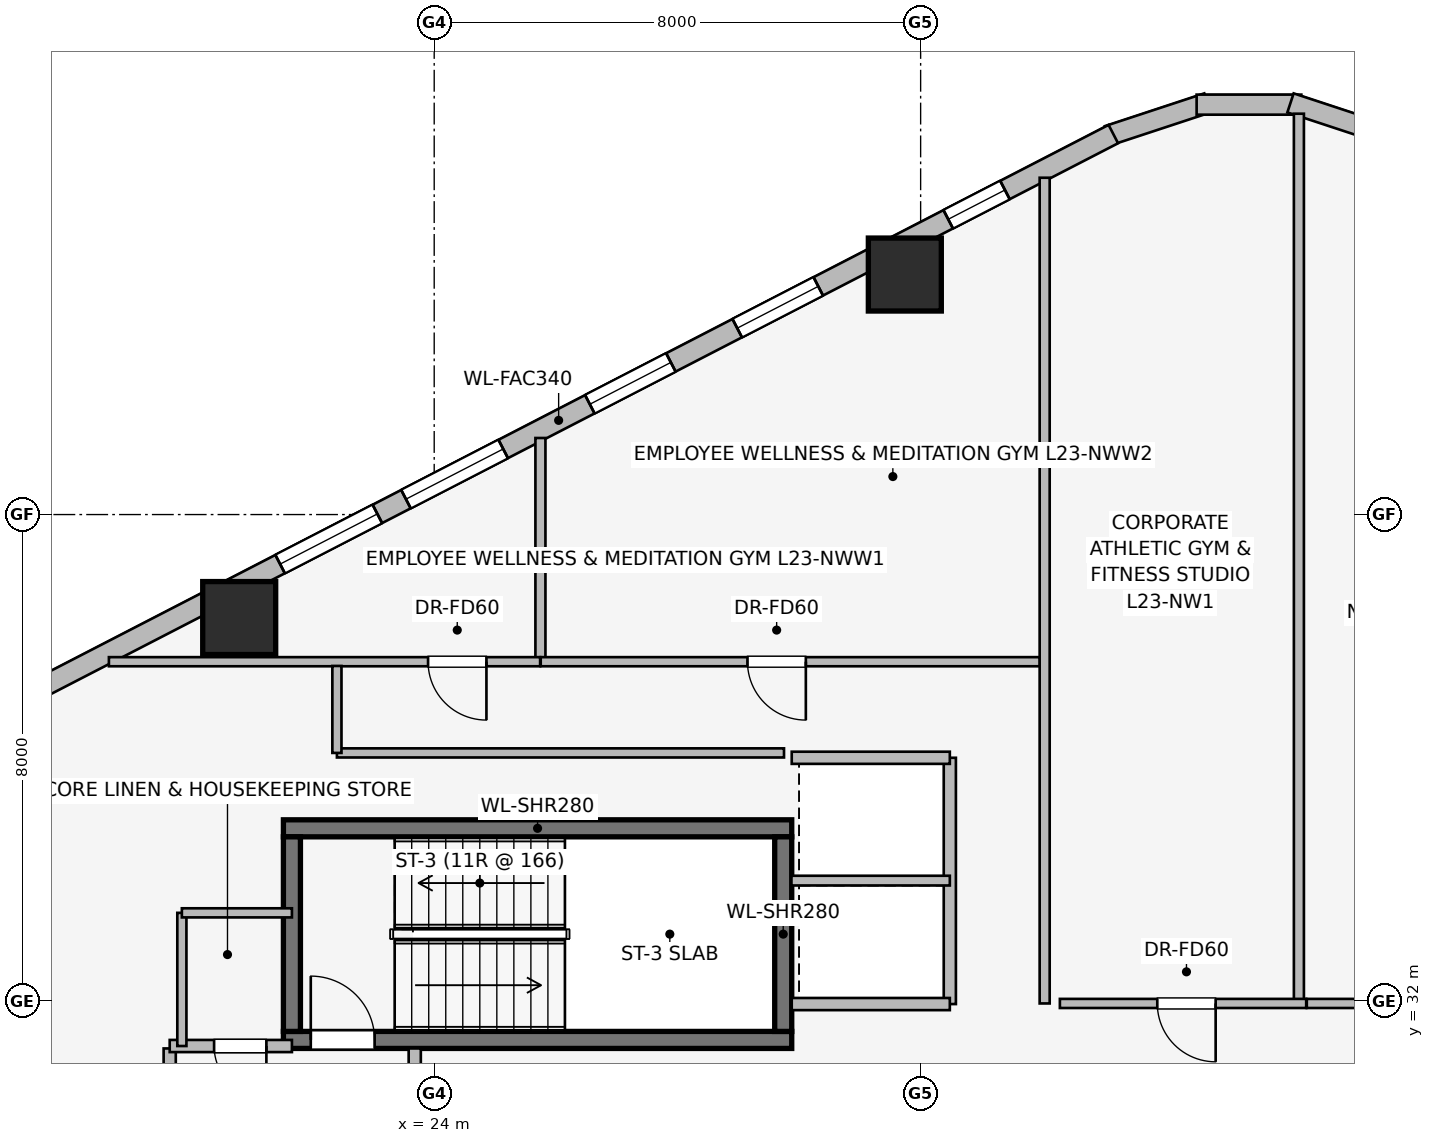
"""IFC4 building model, lengths in metres.
Left out: names, types, materials, properties, quantities, classifications, styles, units other than length and angle.
Written with IfcOpenShell. Run it as: python <this file> out.ifc"""

import sys

from ifc_helpers import new_model, si_unit, direction, frame, frame_2d, origin, origin_2d, place, context, subcontext, project, spatial, rectangle, extrude, element, fill, save


model = new_model("IFC4")
c1 = context("Model", 3, precision=1e-05, world=origin(), true_north=direction((0.0, 1.0)))
c2 = subcontext(c1, "Body", "Model", "MODEL_VIEW")
j1 = project(units=[si_unit("LENGTHUNIT", "METRE"), si_unit("PLANEANGLEUNIT", "RADIAN")], contexts=[c1])
p1 = place(None, origin())
s1 = spatial("IfcSite", under=j1, at=p1, CompositionType="ELEMENT")
p2 = place(p1, origin())
s2 = spatial("IfcBuilding", under=s1, at=p2, CompositionType="ELEMENT")
p3 = place(p2, frame((0.0, 0.0, 89.05)))
s3 = spatial("IfcBuildingStorey", under=s2, at=p3, CompositionType="ELEMENT", Elevation=89.05)
p4 = place(p3, frame((21.52, 31.36, 0.0), z_axis=(0.0, 0.0, 1.0), x_axis=(1.0, 0.0, 0.0)))
e1 = element("IfcWall", 1, at=p4, inside=s3, PredefinedType="SHEAR", context=c2, shape_type="SweptSolid", body=[
    extrude(rectangle(XDim=8.36, YDim=0.28, at=frame_2d((4.18, 0.0))), origin(), (0.0, 0.0, 1.0), 3.65),
])
p5 = place(p4, frame((0.45, 0.0, 0.0)))
e2 = element("IfcOpeningElement", 2, at=p5, cuts=e1, PredefinedType="OPENING", context=c2, shape_type="SweptSolid", body=[
    extrude(rectangle(XDim=1.05, YDim=2.0, at=frame_2d((0.525, 1.0))), frame((0.0, 0.15, 0.0), z_axis=(0.0, -1.0, 0.0), x_axis=(1.0, 0.0, 0.0)), (0.0, 0.0, 1.0), 0.3),
])
p6 = place(p3, frame((29.88, 34.84, 0.0), z_axis=(0.0, 0.0, 1.0), x_axis=(-1.0, 0.0, 0.0)))
e3 = element("IfcWall", 3, at=p6, inside=s3, PredefinedType="SHEAR", context=c2, shape_type="SweptSolid", body=[
    extrude(rectangle(XDim=8.36, YDim=0.28, at=frame_2d((4.18, 0.0))), origin(), (0.0, 0.0, 1.0), 3.65),
])
for number, where, z_axis, x_axis in (
    (4, (21.66, 34.7, 0.0), (0.0, 0.0, 1.0), (0.0, -1.0, 0.0)),
    (5, (29.74, 31.5, 0.0), (0.0, 0.0, 1.0), (0.0, 1.0, 0.0)),
):
    element("IfcWall", number, at=place(p3, frame(where, z_axis=z_axis, x_axis=x_axis)), inside=s3, PredefinedType="SHEAR", context=c2, shape_type="SweptSolid", body=[
        extrude(rectangle(XDim=3.2, YDim=0.28, at=frame_2d((1.6, 0.0))), origin(), (0.0, 0.0, 1.0), 3.65),
    ])
for number, where, z_axis, x_axis in (
    (6, (31.74, 43.947, 0.0), (0.0, 0.0, 1.0), (1.0, 0.0, 0.0)),
    (7, (20.793, 38.298, 0.0), (0.0, 0.0, 1.0), (1.0, 0.0, 0.0)),
):
    element("IfcColumn", number, at=place(p3, frame(where, z_axis=z_axis, x_axis=x_axis)), inside=s3, PredefinedType="COLUMN", context=c2, shape_type="SweptSolid", body=[
        extrude(rectangle(XDim=1.2, YDim=1.2, at=origin_2d()), origin(), (0.0, 0.0, 1.0), 3.65),
    ])
p7 = place(p3, frame((35.081, 46.231, 0.0), z_axis=(0.0, 0.0, 1.0), x_axis=(0.94976901097, 0.312951794691, 0.0)))
e8 = element("IfcWall", 8, at=p7, inside=s3, PredefinedType="STANDARD", context=c2, shape_type="SweptSolid", body=[
    extrude(rectangle(XDim=1.722, YDim=0.33, at=frame_2d((0.861, 0.0))), origin(), (0.0, 0.0, 1.0), 3.39),
])
p8 = place(p3, frame((36.539, 46.741, 0.0), z_axis=(0.0, 0.0, 1.0), x_axis=(1.0, 0.0, 0.0)))
e9 = element("IfcWall", 9, at=p8, inside=s3, PredefinedType="STANDARD", context=c2, shape_type="SweptSolid", body=[
    extrude(rectangle(XDim=1.722, YDim=0.33, at=frame_2d((0.861, 0.0))), origin(), (0.0, 0.0, 1.0), 3.39),
])
p9 = place(p3, frame((38.083, 46.77, 0.0), z_axis=(0.0, 0.0, 1.0), x_axis=(0.94976901097, -0.312951794691, 0.0)))
e10 = element("IfcWall", 10, at=p9, inside=s3, PredefinedType="STANDARD", context=c2, shape_type="SweptSolid", body=[
    extrude(rectangle(XDim=1.722, YDim=0.33, at=frame_2d((0.861, 0.0))), origin(), (0.0, 0.0, 1.0), 3.39),
])
p10 = place(p3, frame((16.924, 36.841, 0.0), z_axis=(0.0, 0.0, 1.0), x_axis=(0.888634413993, 0.458616264721, 0.0)))
e11 = element("IfcWall", 11, at=p10, inside=s3, PredefinedType="STANDARD", context=c2, shape_type="SweptSolid", body=[
    extrude(rectangle(XDim=20.531, YDim=0.34, at=frame_2d((10.266, 0.0))), origin(), (0.0, 0.0, 1.0), 2.684),
])
p11 = place(p10, frame((5.111, 0.0, 0.75)))
e12 = element("IfcOpeningElement", 12, at=p11, cuts=e11, PredefinedType="OPENING", context=c2, shape_type="SweptSolid", body=[
    extrude(rectangle(XDim=1.8, YDim=1.5, at=frame_2d((0.9, 0.75))), frame((0.0, 0.18, 0.0), z_axis=(0.0, -1.0, 0.0), x_axis=(1.0, 0.0, 0.0)), (0.0, 0.0, 1.0), 0.36),
])
p12 = place(p10, frame((7.44, 0.0, 0.75)))
e13 = element("IfcOpeningElement", 13, at=p12, cuts=e11, PredefinedType="OPENING", context=c2, shape_type="SweptSolid", body=[
    extrude(rectangle(XDim=1.8, YDim=1.5, at=frame_2d((0.9, 0.75))), frame((0.0, 0.18, 0.0), z_axis=(0.0, -1.0, 0.0), x_axis=(1.0, 0.0, 0.0)), (0.0, 0.0, 1.0), 0.36),
])
p13 = place(p10, frame((10.843, 0.0, 0.75)))
e14 = element("IfcOpeningElement", 14, at=p13, cuts=e11, PredefinedType="OPENING", context=c2, shape_type="SweptSolid", body=[
    extrude(rectangle(XDim=1.5, YDim=1.5, at=frame_2d((0.75, 0.75))), frame((0.0, 0.18, 0.0), z_axis=(0.0, -1.0, 0.0), x_axis=(1.0, 0.0, 0.0)), (0.0, 0.0, 1.0), 0.36),
])
p14 = place(p10, frame((13.571, 0.0, 0.75)))
e15 = element("IfcOpeningElement", 15, at=p14, cuts=e11, PredefinedType="OPENING", context=c2, shape_type="SweptSolid", body=[
    extrude(rectangle(XDim=1.5, YDim=1.5, at=frame_2d((0.75, 0.75))), frame((0.0, 0.18, 0.0), z_axis=(0.0, -1.0, 0.0), x_axis=(1.0, 0.0, 0.0)), (0.0, 0.0, 1.0), 0.36),
])
p15 = place(p10, frame((17.476, 0.0, 0.75)))
e16 = element("IfcOpeningElement", 16, at=p15, cuts=e11, PredefinedType="OPENING", context=c2, shape_type="SweptSolid", body=[
    extrude(rectangle(XDim=1.05, YDim=1.4, at=frame_2d((0.525, 0.7))), frame((0.0, 0.18, 0.0), z_axis=(0.0, -1.0, 0.0), x_axis=(1.0, 0.0, 0.0)), (0.0, 0.0, 1.0), 0.36),
])
p16 = place(p3, frame((19.65, 25.68, 0.0), z_axis=(0.0, 0.0, 1.0), x_axis=(0.0, 1.0, 0.0)))
e17 = element("IfcWall", 17, at=p16, inside=s3, PredefinedType="PARTITIONING", context=c2, shape_type="SweptSolid", body=[
    extrude(rectangle(XDim=5.54, YDim=0.2, at=frame_2d((2.77, 0.0))), origin(), (0.0, 0.0, 1.0), 3.39),
])
p17 = place(p16, frame((0.62, 0.0, 0.0)))
e18 = element("IfcOpeningElement", 18, at=p17, cuts=e17, PredefinedType="OPENING", context=c2, shape_type="SweptSolid", body=[
    extrude(rectangle(XDim=1.1, YDim=2.2, at=frame_2d((0.55, 1.1))), frame((0.0, 0.11, 0.0), z_axis=(0.0, -1.0, 0.0), x_axis=(1.0, 0.0, 0.0)), (0.0, 0.0, 1.0), 0.22),
])
p18 = place(p16, frame((3.12, 0.0, 0.0)))
e19 = element("IfcOpeningElement", 19, at=p18, cuts=e17, PredefinedType="OPENING", context=c2, shape_type="SweptSolid", body=[
    extrude(rectangle(XDim=1.1, YDim=2.2, at=frame_2d((0.55, 1.1))), frame((0.0, 0.11, 0.0), z_axis=(0.0, -1.0, 0.0), x_axis=(1.0, 0.0, 0.0)), (0.0, 0.0, 1.0), 0.22),
])
p19 = place(p3, frame((23.68, 25.68, 0.0), z_axis=(0.0, 0.0, 1.0), x_axis=(0.0, 1.0, 0.0)))
e20 = element("IfcWall", 20, at=p19, inside=s3, PredefinedType="PARTITIONING", context=c2, shape_type="SweptSolid", body=[
    extrude(rectangle(XDim=5.54, YDim=0.2, at=frame_2d((2.77, 0.0))), origin(), (0.0, 0.0, 1.0), 3.39),
])
p20 = place(p19, frame((1.8, 0.0, 0.0)))
e21 = element("IfcOpeningElement", 21, at=p20, cuts=e20, PredefinedType="OPENING", context=c2, shape_type="SweptSolid", body=[
    extrude(rectangle(XDim=1.05, YDim=2.0, at=frame_2d((0.525, 1.0))), frame((0.0, 0.11, 0.0), z_axis=(0.0, -1.0, 0.0), x_axis=(1.0, 0.0, 0.0)), (0.0, 0.0, 1.0), 0.22),
])
p21 = place(p3, frame((21.66, 31.26, 0.0), z_axis=(0.0, 0.0, 1.0), x_axis=(-1.0, 0.0, 0.0)))
e22 = element("IfcWall", 22, at=p21, inside=s3, PredefinedType="PARTITIONING", context=c2, shape_type="SweptSolid", body=[
    extrude(rectangle(XDim=2.01, YDim=0.2, at=frame_2d((1.005, 0.0))), origin(), (0.0, 0.0, 1.0), 3.39),
])
p22 = place(p21, frame((0.42, 0.0, 0.0)))
e23 = element("IfcOpeningElement", 23, at=p22, cuts=e22, PredefinedType="OPENING", context=c2, shape_type="SweptSolid", body=[
    extrude(rectangle(XDim=0.86, YDim=2.0, at=frame_2d((0.43, 1.0))), frame((0.0, 0.11, 0.0), z_axis=(0.0, -1.0, 0.0), x_axis=(1.0, 0.0, 0.0)), (0.0, 0.0, 1.0), 0.22),
])
p23 = place(p3, frame((32.48, 31.95, 0.0), z_axis=(0.0, 0.0, 1.0), x_axis=(0.0, 1.0, 0.0)))
e24 = element("IfcWall", 24, at=p23, inside=s3, PredefinedType="PARTITIONING", context=c2, shape_type="SweptSolid", body=[
    extrude(rectangle(XDim=4.05, YDim=0.2, at=frame_2d((2.025, 0.0))), origin(), (0.0, 0.0, 1.0), 2.513),
])
for number, where, z_axis, x_axis in (
    (25, (29.88, 36.0, 0.0), (0.0, 0.0, 1.0), (1.0, 0.0, 0.0)),
    (26, (32.48, 31.95, 0.0), (0.0, 0.0, 1.0), (-1.0, 0.0, 0.0)),
):
    element("IfcWall", number, at=place(p3, frame(where, z_axis=z_axis, x_axis=x_axis)), inside=s3, PredefinedType="PARTITIONING", context=c2, shape_type="SweptSolid", body=[
        extrude(rectangle(XDim=2.6, YDim=0.2, at=frame_2d((1.3, 0.0))), origin(), (0.0, 0.0, 1.0), 3.39),
    ])
p24 = place(p3, frame((29.875, 33.98, 0.0), z_axis=(0.0, 0.0, 1.0), x_axis=(1.0, 0.0, 0.0)))
e27 = element("IfcWall", 27, at=p24, inside=s3, PredefinedType="PARTITIONING", context=c2, shape_type="SweptSolid", body=[
    extrude(rectangle(XDim=2.605, YDim=0.16, at=frame_2d((1.302, 0.0))), origin(), (0.0, 0.0, 1.0), 3.39),
])
p25 = place(p3, frame((19.85, 33.45, 0.0), z_axis=(0.0, 0.0, 1.0), x_axis=(0.0, -1.0, 0.0)))
e28 = element("IfcWall", 28, at=p25, inside=s3, PredefinedType="PARTITIONING", context=c2, shape_type="SweptSolid", body=[
    extrude(rectangle(XDim=2.19, YDim=0.15, at=frame_2d((1.095, 0.0))), origin(), (0.0, 0.0, 1.0), 3.39),
])
p26 = place(p3, frame((21.66, 33.45, 0.0), z_axis=(0.0, 0.0, 1.0), x_axis=(-1.0, 0.0, 0.0)))
e29 = element("IfcWall", 29, at=p26, inside=s3, PredefinedType="PARTITIONING", context=c2, shape_type="SweptSolid", body=[
    extrude(rectangle(XDim=1.81, YDim=0.15, at=frame_2d((0.905, 0.0))), origin(), (0.0, 0.0, 1.0), 3.39),
])
p27 = place(p3, frame((25.747, 37.61, 0.0), z_axis=(0.0, 0.0, 1.0), x_axis=(0.0, 1.0, 0.0)))
e30 = element("IfcWall", 30, at=p27, inside=s3, PredefinedType="PARTITIONING", context=c2, shape_type="SweptSolid", body=[
    extrude(rectangle(XDim=3.649, YDim=0.165, at=frame_2d((1.824, 0.0))), origin(), (0.0, 0.0, 1.0), 3.39),
])
p28 = place(p3, frame((25.742, 37.58, 0.0), z_axis=(0.0, 0.0, 1.0), x_axis=(-1.0, 0.0, 0.0)))
e31 = element("IfcWall", 31, at=p28, inside=s3, PredefinedType="PARTITIONING", context=c2, shape_type="SweptSolid", body=[
    extrude(rectangle(XDim=7.092, YDim=0.15, at=frame_2d((3.546, 0.0))), origin(), (0.0, 0.0, 1.0), 3.39),
])
p29 = place(p28, frame((0.883, 0.0, 0.0)))
e32 = element("IfcOpeningElement", 32, at=p29, cuts=e31, PredefinedType="OPENING", context=c2, shape_type="SweptSolid", body=[
    extrude(rectangle(XDim=0.96, YDim=2.0, at=frame_2d((0.48, 1.0))), frame((0.0, 0.085, 0.0), z_axis=(0.0, -1.0, 0.0), x_axis=(1.0, 0.0, 0.0)), (0.0, 0.0, 1.0), 0.17),
])
p30 = place(p3, frame((33.962, 37.58, 0.0), z_axis=(0.0, 0.0, 1.0), x_axis=(-1.0, 0.0, 0.0)))
e33 = element("IfcWall", 33, at=p30, inside=s3, PredefinedType="PARTITIONING", context=c2, shape_type="SweptSolid", body=[
    extrude(rectangle(XDim=8.21, YDim=0.15, at=frame_2d((4.105, 0.0))), origin(), (0.0, 0.0, 1.0), 3.39),
])
p31 = place(p30, frame((3.85, 0.0, 0.0)))
e34 = element("IfcOpeningElement", 34, at=p31, cuts=e33, PredefinedType="OPENING", context=c2, shape_type="SweptSolid", body=[
    extrude(rectangle(XDim=0.96, YDim=2.0, at=frame_2d((0.48, 1.0))), frame((0.0, 0.085, 0.0), z_axis=(0.0, -1.0, 0.0), x_axis=(1.0, 0.0, 0.0)), (0.0, 0.0, 1.0), 0.17),
])
p32 = place(p3, frame((34.04, 31.96, 0.0), z_axis=(0.0, 0.0, 1.0), x_axis=(0.0, 1.0, 0.0)))
e35 = element("IfcWall", 35, at=p32, inside=s3, PredefinedType="PARTITIONING", context=c2, shape_type="SweptSolid", body=[
    extrude(rectangle(XDim=13.579, YDim=0.165, at=frame_2d((6.79, 0.0))), origin(), (0.0, 0.0, 1.0), 3.39),
])
p33 = place(p3, frame((38.221, 31.97, 0.0), z_axis=(0.0, 0.0, 1.0), x_axis=(0.0, 1.0, 0.0)))
e36 = element("IfcWall", 36, at=p33, inside=s3, PredefinedType="PARTITIONING", context=c2, shape_type="SweptSolid", body=[
    extrude(rectangle(XDim=14.622, YDim=0.165, at=frame_2d((7.311, 0.0))), origin(), (0.0, 0.0, 1.0), 3.39),
])
p34 = place(p3, frame((38.341, 31.96, 0.0), z_axis=(0.0, 0.0, 1.0), x_axis=(-1.0, 0.0, 0.0)))
e37 = element("IfcWall", 37, at=p34, inside=s3, PredefinedType="PARTITIONING", context=c2, shape_type="SweptSolid", body=[
    extrude(rectangle(XDim=4.051, YDim=0.15, at=frame_2d((2.025, 0.0))), origin(), (0.0, 0.0, 1.0), 3.39),
])
p35 = place(p34, frame((1.489, 0.0, 0.0)))
e38 = element("IfcOpeningElement", 38, at=p35, cuts=e37, PredefinedType="OPENING", context=c2, shape_type="SweptSolid", body=[
    extrude(rectangle(XDim=0.96, YDim=2.0, at=frame_2d((0.48, 1.0))), frame((0.0, 0.085, 0.0), z_axis=(0.0, -1.0, 0.0), x_axis=(1.0, 0.0, 0.0)), (0.0, 0.0, 1.0), 0.17),
])
p36 = place(p3, frame((42.605, 31.96, 0.0), z_axis=(0.0, 0.0, 1.0), x_axis=(-1.0, 0.0, 0.0)))
e39 = element("IfcWall", 39, at=p36, inside=s3, PredefinedType="PARTITIONING", context=c2, shape_type="SweptSolid", body=[
    extrude(rectangle(XDim=4.254, YDim=0.15, at=frame_2d((2.127, 0.0))), origin(), (0.0, 0.0, 1.0), 3.39),
])
p37 = place(p36, frame((1.704, 0.0, 0.0)))
e40 = element("IfcOpeningElement", 40, at=p37, cuts=e39, PredefinedType="OPENING", context=c2, shape_type="SweptSolid", body=[
    extrude(rectangle(XDim=0.96, YDim=2.0, at=frame_2d((0.48, 1.0))), frame((0.0, 0.085, 0.0), z_axis=(0.0, -1.0, 0.0), x_axis=(1.0, 0.0, 0.0)), (0.0, 0.0, 1.0), 0.17),
])
p38 = place(p3, frame((29.753, 36.08, 0.0), z_axis=(0.0, 0.0, 1.0), x_axis=(-1.0, 0.0, 0.0)))
e41 = element("IfcWall", 41, at=p38, inside=s3, PredefinedType="PARTITIONING", context=c2, shape_type="SweptSolid", body=[
    extrude(rectangle(XDim=7.353, YDim=0.15, at=frame_2d((3.677, 0.0))), origin(), (0.0, 0.0, 1.0), 3.39),
])
p39 = place(p3, frame((22.4, 36.08, 0.0), z_axis=(0.0, 0.0, 1.0), x_axis=(0.0, 1.0, 0.0)))
e42 = element("IfcWall", 42, at=p39, inside=s3, PredefinedType="PARTITIONING", context=c2, shape_type="SweptSolid", body=[
    extrude(rectangle(XDim=1.43, YDim=0.15, at=frame_2d((0.715, 0.0))), origin(), (0.0, 0.0, 1.0), 3.39),
])
p40 = place(p11, origin())
e43 = element("IfcWindow", 43, at=p40, inside=s3, PartitioningType="SINGLE_PANEL", PredefinedType="WINDOW", context=c2, shape_type="SweptSolid", body=[
    extrude(rectangle(XDim=1.8, YDim=1.5, at=frame_2d((0.9, 0.75))), frame((0.0, 0.03, 0.0), z_axis=(0.0, -1.0, 0.0), x_axis=(1.0, 0.0, 0.0)), (0.0, 0.0, 1.0), 0.06),
])
fill(e12, e43)
p41 = place(p12, origin())
e44 = element("IfcWindow", 44, at=p41, inside=s3, PartitioningType="SINGLE_PANEL", PredefinedType="WINDOW", context=c2, shape_type="SweptSolid", body=[
    extrude(rectangle(XDim=1.8, YDim=1.5, at=frame_2d((0.9, 0.75))), frame((0.0, 0.03, 0.0), z_axis=(0.0, -1.0, 0.0), x_axis=(1.0, 0.0, 0.0)), (0.0, 0.0, 1.0), 0.06),
])
fill(e13, e44)
p42 = place(p13, origin())
e45 = element("IfcWindow", 45, at=p42, inside=s3, PartitioningType="SINGLE_PANEL", PredefinedType="WINDOW", context=c2, shape_type="SweptSolid", body=[
    extrude(rectangle(XDim=1.5, YDim=1.5, at=frame_2d((0.75, 0.75))), frame((0.0, 0.03, 0.0), z_axis=(0.0, -1.0, 0.0), x_axis=(1.0, 0.0, 0.0)), (0.0, 0.0, 1.0), 0.06),
])
fill(e14, e45)
p43 = place(p14, origin())
e46 = element("IfcWindow", 46, at=p43, inside=s3, PartitioningType="SINGLE_PANEL", PredefinedType="WINDOW", context=c2, shape_type="SweptSolid", body=[
    extrude(rectangle(XDim=1.5, YDim=1.5, at=frame_2d((0.75, 0.75))), frame((0.0, 0.03, 0.0), z_axis=(0.0, -1.0, 0.0), x_axis=(1.0, 0.0, 0.0)), (0.0, 0.0, 1.0), 0.06),
])
fill(e15, e46)
p44 = place(p15, origin())
e47 = element("IfcWindow", 47, at=p44, inside=s3, PartitioningType="SINGLE_PANEL", PredefinedType="WINDOW", context=c2, shape_type="SweptSolid", body=[
    extrude(rectangle(XDim=1.05, YDim=1.4, at=frame_2d((0.525, 0.7))), frame((0.0, 0.03, 0.0), z_axis=(0.0, -1.0, 0.0), x_axis=(1.0, 0.0, 0.0)), (0.0, 0.0, 1.0), 0.06),
])
fill(e16, e47)
p45 = place(p5, origin())
e48 = element("IfcDoor", 48, at=p45, inside=s3, OperationType="SINGLE_SWING_LEFT", PredefinedType="DOOR", context=c2, shape_type="SweptSolid", body=[
    extrude(rectangle(XDim=1.05, YDim=2.0, at=frame_2d((0.525, 1.0))), frame((0.0, 0.025, 0.0), z_axis=(0.0, -1.0, 0.0), x_axis=(1.0, 0.0, 0.0)), (0.0, 0.0, 1.0), 0.05),
])
fill(e2, e48)
p46 = place(p22, origin())
e49 = element("IfcDoor", 49, at=p46, inside=s3, OperationType="SINGLE_SWING_LEFT", PredefinedType="DOOR", context=c2, shape_type="SweptSolid", body=[
    extrude(rectangle(XDim=0.86, YDim=2.0, at=frame_2d((0.43, 1.0))), frame((0.0, 0.025, 0.0), z_axis=(0.0, -1.0, 0.0), x_axis=(1.0, 0.0, 0.0)), (0.0, 0.0, 1.0), 0.05),
])
fill(e23, e49)
p47 = place(p29, origin())
e50 = element("IfcDoor", 50, at=p47, inside=s3, OperationType="SINGLE_SWING_LEFT", PredefinedType="DOOR", context=c2, shape_type="SweptSolid", body=[
    extrude(rectangle(XDim=0.96, YDim=2.0, at=frame_2d((0.48, 1.0))), frame((0.0, 0.025, 0.0), z_axis=(0.0, -1.0, 0.0), x_axis=(1.0, 0.0, 0.0)), (0.0, 0.0, 1.0), 0.05),
])
fill(e32, e50)
p48 = place(p31, origin())
e51 = element("IfcDoor", 51, at=p48, inside=s3, OperationType="SINGLE_SWING_LEFT", PredefinedType="DOOR", context=c2, shape_type="SweptSolid", body=[
    extrude(rectangle(XDim=0.96, YDim=2.0, at=frame_2d((0.48, 1.0))), frame((0.0, 0.025, 0.0), z_axis=(0.0, -1.0, 0.0), x_axis=(1.0, 0.0, 0.0)), (0.0, 0.0, 1.0), 0.05),
])
fill(e34, e51)
p49 = place(p35, origin())
e52 = element("IfcDoor", 52, at=p49, inside=s3, OperationType="SINGLE_SWING_LEFT", PredefinedType="DOOR", context=c2, shape_type="SweptSolid", body=[
    extrude(rectangle(XDim=0.96, YDim=2.0, at=frame_2d((0.48, 1.0))), frame((0.0, 0.025, 0.0), z_axis=(0.0, -1.0, 0.0), x_axis=(1.0, 0.0, 0.0)), (0.0, 0.0, 1.0), 0.05),
])
fill(e38, e52)
save(model, sys.argv[1])
